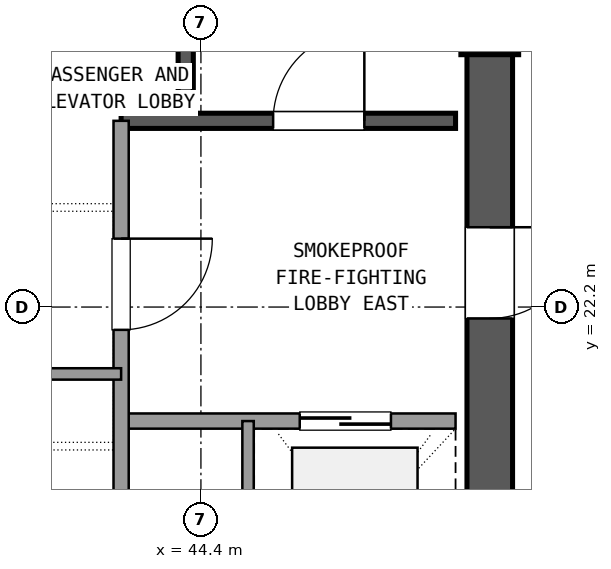
"""IFC4 building model, lengths in metres.
Left out: names, types, materials, properties, quantities, classifications, styles, units other than length and angle.
Written with IfcOpenShell. Run it as: python <this file> out.ifc"""

import sys

from ifc_helpers import new_model, si_unit, direction, frame, frame_2d, origin, origin_2d, place, context, subcontext, project, spatial, rectangle, extrude, element, fill, save


model = new_model("IFC4")
c1 = context("Model", 3, precision=1e-05, world=origin(), true_north=direction((0.0, 1.0)))
c2 = subcontext(c1, "Body", "Model", "MODEL_VIEW")
j1 = project(units=[si_unit("LENGTHUNIT", "METRE"), si_unit("PLANEANGLEUNIT", "RADIAN")], contexts=[c1])
p1 = place(None, origin())
s1 = spatial("IfcSite", under=j1, at=p1, CompositionType="ELEMENT")
p2 = place(p1, origin())
s2 = spatial("IfcBuilding", under=s1, at=p2, CompositionType="ELEMENT")
p3 = place(p2, frame((0.0, 0.0, 286.02)))
s3 = spatial("IfcBuildingStorey", under=s2, at=p3, CompositionType="ELEMENT", Elevation=286.02)
p4 = place(p3, frame((48.2, 25.9, 0.0), z_axis=(0.0, 0.0, 1.0), x_axis=(1.0, 0.0, 0.0)))
e1 = element("IfcColumn", 1, at=p4, inside=s3, PredefinedType="COLUMN", context=c2, shape_type="SweptSolid", body=[
    extrude(rectangle(XDim=0.76, YDim=0.76, at=origin_2d()), origin(), (0.0, 0.0, 1.0), 4.32),
])
p5 = place(p3, frame((48.2, 17.675, 0.0), z_axis=(0.0, 0.0, 1.0), x_axis=(0.0, 1.0, 0.0)))
e2 = element("IfcWall", 2, at=p5, inside=s3, PredefinedType="SHEAR", context=c2, shape_type="SweptSolid", body=[
    extrude(rectangle(XDim=7.85, YDim=0.6, at=frame_2d((3.925, 0.0))), origin(), (0.0, 0.0, 1.0), 4.02),
])
p6 = place(p5, frame((4.375, 0.0, 0.0)))
e3 = element("IfcOpeningElement", 3, at=p6, cuts=e2, PredefinedType="OPENING", context=c2, shape_type="SweptSolid", body=[
    extrude(rectangle(XDim=1.2, YDim=2.15, at=frame_2d((0.6, 1.075))), frame((0.0, 0.31, 0.0), z_axis=(0.0, -1.0, 0.0), x_axis=(1.0, 0.0, 0.0)), (0.0, 0.0, 1.0), 0.62),
])
p7 = place(p3, frame((44.2, 24.65, 0.0), z_axis=(0.0, 0.0, 1.0), x_axis=(0.0, 1.0, 0.0)))
e4 = element("IfcWall", 4, at=p7, inside=s3, PredefinedType="SHEAR", context=c2, shape_type="SweptSolid", body=[
    extrude(rectangle(XDim=9.4, YDim=0.2, at=frame_2d((4.7, 0.0))), origin(), (0.0, 0.0, 1.0), 4.02),
])
p8 = place(p3, frame((43.35, 24.65, 0.0), z_axis=(0.0, 0.0, 1.0), x_axis=(1.0, 0.0, 0.0)))
e5 = element("IfcWall", 5, at=p8, inside=s3, PredefinedType="SHEAR", context=c2, shape_type="SweptSolid", body=[
    extrude(rectangle(XDim=4.4, YDim=0.2, at=frame_2d((2.2, 0.0))), origin(), (0.0, 0.0, 1.0), 4.02),
])
p9 = place(p8, frame((2.0, 0.0, 0.0)))
e6 = element("IfcOpeningElement", 6, at=p9, cuts=e5, PredefinedType="OPENING", context=c2, shape_type="SweptSolid", body=[
    extrude(rectangle(XDim=1.2, YDim=2.15, at=frame_2d((0.6, 1.075))), frame((0.0, 0.11, 0.0), z_axis=(0.0, -1.0, 0.0), x_axis=(1.0, 0.0, 0.0)), (0.0, 0.0, 1.0), 0.22),
])
p10 = place(p3, frame((43.35, 20.7, 0.0), z_axis=(0.0, 0.0, 1.0), x_axis=(1.0, 0.0, 0.0)))
e7 = element("IfcWall", 7, at=p10, inside=s3, PredefinedType="SOLIDWALL", context=c2, shape_type="SweptSolid", body=[
    extrude(rectangle(XDim=4.4, YDim=0.2, at=frame_2d((2.2, 0.0))), origin(), (0.0, 0.0, 1.0), 2.93),
])
p11 = place(p10, frame((2.35, 0.0, 0.0)))
e8 = element("IfcOpeningElement", 8, at=p11, cuts=e7, PredefinedType="OPENING", context=c2, shape_type="SweptSolid", body=[
    extrude(rectangle(XDim=1.2, YDim=2.15, at=frame_2d((0.6, 1.075))), frame((0.0, 0.11, 0.0), z_axis=(0.0, -1.0, 0.0), x_axis=(1.0, 0.0, 0.0)), (0.0, 0.0, 1.0), 0.22),
])
p12 = place(p3, frame((43.35, 17.75, 0.0), z_axis=(0.0, 0.0, 1.0), x_axis=(0.0, 1.0, 0.0)))
e9 = element("IfcWall", 9, at=p12, inside=s3, PredefinedType="SOLIDWALL", context=c2, shape_type="SweptSolid", body=[
    extrude(rectangle(XDim=6.9, YDim=0.2, at=frame_2d((3.45, 0.0))), origin(), (0.0, 0.0, 1.0), 2.93),
])
p13 = place(p12, frame((4.15, 0.0, 0.0)))
e10 = element("IfcOpeningElement", 10, at=p13, cuts=e9, PredefinedType="OPENING", context=c2, shape_type="SweptSolid", body=[
    extrude(rectangle(XDim=1.2, YDim=2.15, at=frame_2d((0.6, 1.075))), frame((0.0, 0.11, 0.0), z_axis=(0.0, -1.0, 0.0), x_axis=(1.0, 0.0, 0.0)), (0.0, 0.0, 1.0), 0.22),
])
p14 = place(p3, frame((45.02, 17.75, 0.0), z_axis=(0.0, 0.0, 1.0), x_axis=(0.0, 1.0, 0.0)))
e11 = element("IfcWall", 11, at=p14, inside=s3, PredefinedType="PARTITIONING", context=c2, shape_type="SweptSolid", body=[
    extrude(rectangle(XDim=2.95, YDim=0.15, at=frame_2d((1.475, 0.0))), origin(), (0.0, 0.0, 1.0), 2.93),
])
p15 = place(p3, frame((37.25, 21.32, 0.0), z_axis=(0.0, 0.0, 1.0), x_axis=(1.0, 0.0, 0.0)))
e12 = element("IfcWall", 12, at=p15, inside=s3, PredefinedType="PARTITIONING", context=c2, shape_type="SweptSolid", body=[
    extrude(rectangle(XDim=6.1, YDim=0.15, at=frame_2d((3.05, 0.0))), origin(), (0.0, 0.0, 1.0), 2.93),
])
p16 = place(p15, frame((0.55, 0.0, 0.0)))
e13 = element("IfcOpeningElement", 13, at=p16, cuts=e12, PredefinedType="OPENING", context=c2, shape_type="SweptSolid", body=[
    extrude(rectangle(XDim=1.0, YDim=2.15, at=frame_2d((0.5, 1.075))), frame((0.0, 0.085, 0.0), z_axis=(0.0, -1.0, 0.0), x_axis=(1.0, 0.0, 0.0)), (0.0, 0.0, 1.0), 0.17),
])
p17 = place(p15, frame((3.15, 0.0, 0.0)))
e14 = element("IfcOpeningElement", 14, at=p17, cuts=e12, PredefinedType="OPENING", context=c2, shape_type="SweptSolid", body=[
    extrude(rectangle(XDim=1.0, YDim=2.15, at=frame_2d((0.5, 1.075))), frame((0.0, 0.085, 0.0), z_axis=(0.0, -1.0, 0.0), x_axis=(1.0, 0.0, 0.0)), (0.0, 0.0, 1.0), 0.17),
])
p18 = place(p9, origin())
e15 = element("IfcDoor", 15, at=p18, inside=s3, OperationType="SINGLE_SWING_RIGHT", PredefinedType="DOOR", context=c2, shape_type="SweptSolid", body=[
    extrude(rectangle(XDim=1.2, YDim=2.15, at=frame_2d((0.6, 1.075))), frame((0.0, 0.025, 0.0), z_axis=(0.0, -1.0, 0.0), x_axis=(1.0, 0.0, 0.0)), (0.0, 0.0, 1.0), 0.05),
])
fill(e6, e15)
p19 = place(p11, origin())
e16 = element("IfcDoor", 16, at=p19, inside=s3, OperationType="SLIDING_TO_RIGHT", PredefinedType="DOOR", context=c2, shape_type="SweptSolid", body=[
    extrude(rectangle(XDim=1.2, YDim=2.15, at=frame_2d((0.6, 1.075))), frame((0.0, 0.025, 0.0), z_axis=(0.0, -1.0, 0.0), x_axis=(1.0, 0.0, 0.0)), (0.0, 0.0, 1.0), 0.05),
])
fill(e8, e16)
p20 = place(p13, frame((1.2, 0.0, 0.0), z_axis=(0.0, 0.0, 1.0), x_axis=(-1.0, 0.0, 0.0)))
e17 = element("IfcDoor", 17, at=p20, inside=s3, OperationType="SINGLE_SWING_RIGHT", PredefinedType="DOOR", context=c2, shape_type="SweptSolid", body=[
    extrude(rectangle(XDim=1.2, YDim=2.15, at=frame_2d((0.6, 1.075))), frame((0.0, 0.025, 0.0), z_axis=(0.0, -1.0, 0.0), x_axis=(1.0, 0.0, 0.0)), (0.0, 0.0, 1.0), 0.05),
])
fill(e10, e17)
p21 = place(p6, frame((1.2, 0.0, 0.0), z_axis=(0.0, 0.0, 1.0), x_axis=(-1.0, 0.0, 0.0)))
e18 = element("IfcDoor", 18, at=p21, inside=s3, OperationType="SINGLE_SWING_RIGHT", PredefinedType="DOOR", context=c2, shape_type="SweptSolid", body=[
    extrude(rectangle(XDim=1.2, YDim=2.15, at=frame_2d((0.6, 1.075))), frame((0.0, 0.025, 0.0), z_axis=(0.0, -1.0, 0.0), x_axis=(1.0, 0.0, 0.0)), (0.0, 0.0, 1.0), 0.05),
])
fill(e3, e18)
save(model, sys.argv[1])
